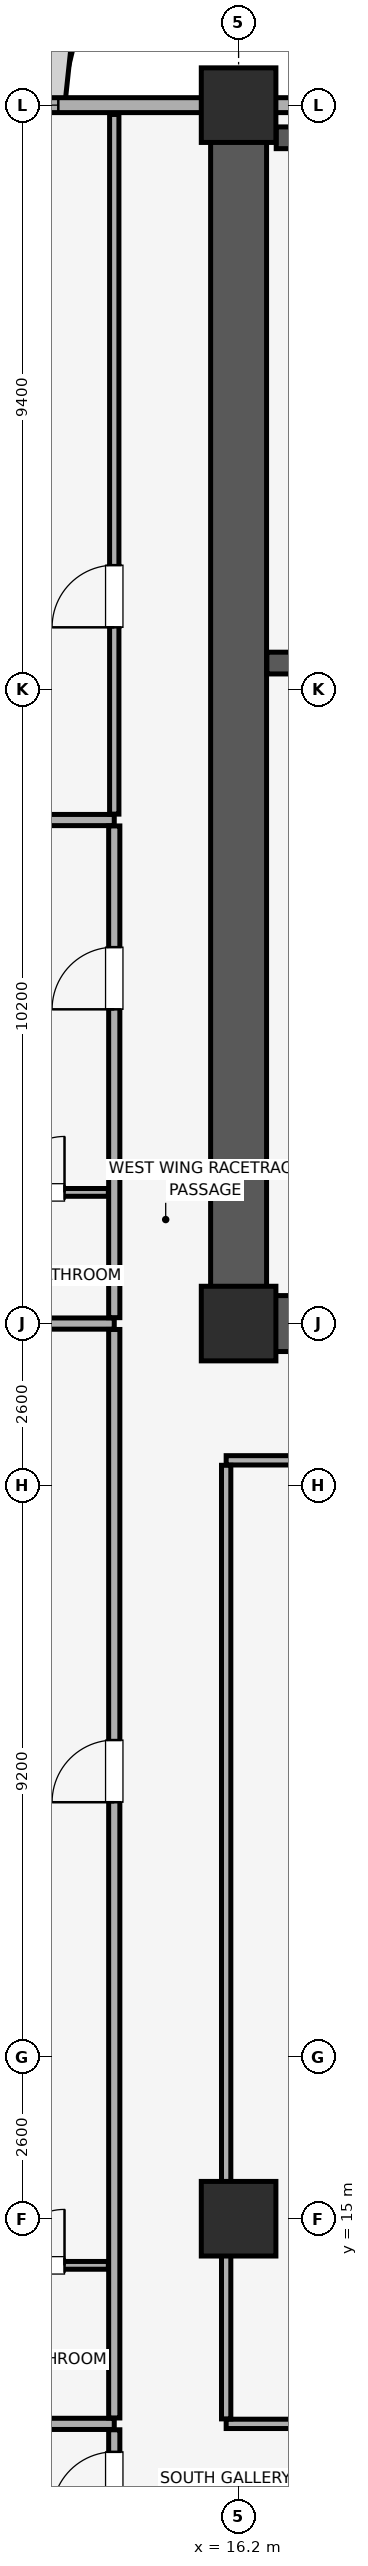
"""IFC4 building model, lengths in metres.
Left out: names, types, materials, properties, quantities, classifications, styles, units other than length and angle.
Written with IfcOpenShell. Run it as: python <this file> out.ifc"""

import sys

from ifc_helpers import new_model, si_unit, direction, frame, frame_2d, origin, origin_2d, place, context, subcontext, project, spatial, rectangle, extrude, element, fill, save


model = new_model("IFC4")
c1 = context("Model", 3, precision=1e-05, world=origin(), true_north=direction((0.0, 1.0)))
c2 = subcontext(c1, "Body", "Model", "MODEL_VIEW")
j1 = project(units=[si_unit("LENGTHUNIT", "METRE"), si_unit("PLANEANGLEUNIT", "RADIAN")], contexts=[c1])
p1 = place(None, origin())
s1 = spatial("IfcSite", under=j1, at=p1, CompositionType="ELEMENT")
p2 = place(p1, origin())
s2 = spatial("IfcBuilding", under=s1, at=p2, CompositionType="ELEMENT")
p3 = place(p2, frame((0.0, 0.0, 135.35)))
s3 = spatial("IfcBuildingStorey", under=s2, at=p3, CompositionType="ELEMENT", Elevation=135.35)
for number, where, z_axis, x_axis in (
    (1, (16.2, 15.0, 0.0), (0.0, 0.0, 1.0), (1.0, 0.0, 0.0)),
    (2, (16.2, 29.4, 0.0), (0.0, 0.0, 1.0), (1.0, 0.0, 0.0)),
    (3, (16.2, 49.0, 0.0), (0.0, 0.0, 1.0), (1.0, 0.0, 0.0)),
):
    element("IfcColumn", number, at=place(p3, frame(where, z_axis=z_axis, x_axis=x_axis)), inside=s3, PredefinedType="COLUMN", context=c2, shape_type="SweptSolid", body=[
        extrude(rectangle(XDim=1.2, YDim=1.2, at=origin_2d()), origin(), (0.0, 0.0, 1.0), 3.56),
    ])
p4 = place(p3, frame((77.0, 49.0, 0.0), z_axis=(0.0, 0.0, 1.0), x_axis=(-1.0, 0.0, 0.0)))
e4 = element("IfcWall", 4, at=p4, inside=s3, PredefinedType="SOLIDWALL", context=c2, shape_type="SweptSolid", body=[
    extrude(rectangle(XDim=70.0, YDim=0.24, at=frame_2d((35.0, 0.0))), origin(), (0.0, 0.0, 1.0), 2.61),
])
p5 = place(p4, frame((63.7, 0.0, 0.85)))
e5 = element("IfcOpeningElement", 5, at=p5, cuts=e4, PredefinedType="OPENING", context=c2, shape_type="SweptSolid", body=[
    extrude(rectangle(XDim=3.0, YDim=1.5, at=frame_2d((1.5, 0.75))), frame((0.0, 0.13, 0.0), z_axis=(0.0, -1.0, 0.0), x_axis=(1.0, 0.0, 0.0)), (0.0, 0.0, 1.0), 0.26),
])
p6 = place(p4, frame((3.3, 0.0, 0.85)))
e6 = element("IfcOpeningElement", 6, at=p6, cuts=e4, PredefinedType="OPENING", context=c2, shape_type="SweptSolid", body=[
    extrude(rectangle(XDim=3.0, YDim=1.5, at=frame_2d((1.5, 0.75))), frame((0.0, 0.13, 0.0), z_axis=(0.0, -1.0, 0.0), x_axis=(1.0, 0.0, 0.0)), (0.0, 0.0, 1.0), 0.26),
])
p7 = place(p4, frame((48.565, 0.0, 0.9)))
e7 = element("IfcOpeningElement", 7, at=p7, cuts=e4, PredefinedType="OPENING", context=c2, shape_type="SweptSolid", body=[
    extrude(rectangle(XDim=1.5, YDim=1.4, at=frame_2d((0.75, 0.7))), frame((0.0, 0.13, 0.0), z_axis=(0.0, -1.0, 0.0), x_axis=(1.0, 0.0, 0.0)), (0.0, 0.0, 1.0), 0.26),
])
p8 = place(p4, frame((41.75, 0.0, 0.9)))
e8 = element("IfcOpeningElement", 8, at=p8, cuts=e4, PredefinedType="OPENING", context=c2, shape_type="SweptSolid", body=[
    extrude(rectangle(XDim=1.5, YDim=1.4, at=frame_2d((0.75, 0.7))), frame((0.0, 0.13, 0.0), z_axis=(0.0, -1.0, 0.0), x_axis=(1.0, 0.0, 0.0)), (0.0, 0.0, 1.0), 0.26),
])
p9 = place(p4, frame((25.3, 0.0, 0.9)))
e9 = element("IfcOpeningElement", 9, at=p9, cuts=e4, PredefinedType="OPENING", context=c2, shape_type="SweptSolid", body=[
    extrude(rectangle(XDim=1.5, YDim=1.4, at=frame_2d((0.75, 0.7))), frame((0.0, 0.13, 0.0), z_axis=(0.0, -1.0, 0.0), x_axis=(1.0, 0.0, 0.0)), (0.0, 0.0, 1.0), 0.26),
])
p10 = place(p4, frame((20.685, 0.0, 0.9)))
e10 = element("IfcOpeningElement", 10, at=p10, cuts=e4, PredefinedType="OPENING", context=c2, shape_type="SweptSolid", body=[
    extrude(rectangle(XDim=1.5, YDim=1.4, at=frame_2d((0.75, 0.7))), frame((0.0, 0.13, 0.0), z_axis=(0.0, -1.0, 0.0), x_axis=(1.0, 0.0, 0.0)), (0.0, 0.0, 1.0), 0.26),
])
p11 = place(p3, frame((16.2, 29.4, 0.0), z_axis=(0.0, 0.0, 1.0), x_axis=(0.0, 1.0, 0.0)))
e11 = element("IfcWall", 11, at=p11, inside=s3, PredefinedType="SHEAR", context=c2, shape_type="SweptSolid", body=[
    extrude(rectangle(XDim=19.2, YDim=0.9, at=frame_2d((9.6, 0.0))), origin(), (0.0, 0.0, 1.0), 3.56),
])
p12 = place(p3, frame((16.655, 29.4, 0.0), z_axis=(0.0, 0.0, 1.0), x_axis=(1.0, 0.0, 0.0)))
e12 = element("IfcWall", 12, at=p12, inside=s3, PredefinedType="SHEAR", context=c2, shape_type="SweptSolid", body=[
    extrude(rectangle(XDim=6.945, YDim=0.9, at=frame_2d((3.473, 0.0))), origin(), (0.0, 0.0, 1.0), 3.56),
])
p13 = place(p3, frame((16.655, 40.025, 0.0), z_axis=(0.0, 0.0, 1.0), x_axis=(1.0, 0.0, 0.0)))
e13 = element("IfcWall", 13, at=p13, inside=s3, PredefinedType="SHEAR", context=c2, shape_type="SweptSolid", body=[
    extrude(rectangle(XDim=4.2, YDim=0.35, at=frame_2d((2.1, 0.0))), origin(), (0.0, 0.0, 1.0), 3.56),
])
p14 = place(p13, frame((1.81, 0.0, 0.0)))
e14 = element("IfcOpeningElement", 14, at=p14, cuts=e13, PredefinedType="OPENING", context=c2, shape_type="SweptSolid", body=[
    extrude(rectangle(XDim=1.15, YDim=2.15, at=frame_2d((0.575, 1.075))), frame((0.0, 0.185, 0.0), z_axis=(0.0, -1.0, 0.0), x_axis=(1.0, 0.0, 0.0)), (0.0, 0.0, 1.0), 0.37),
])
p15 = place(p3, frame((16.805, 48.475, 0.0), z_axis=(0.0, 0.0, 1.0), x_axis=(1.0, 0.0, 0.0)))
e15 = element("IfcWall", 15, at=p15, inside=s3, PredefinedType="SHEAR", context=c2, shape_type="SweptSolid", body=[
    extrude(rectangle(XDim=4.05, YDim=0.35, at=frame_2d((2.025, 0.0))), origin(), (0.0, 0.0, 1.0), 3.56),
])
p16 = place(p3, frame((3.15, 11.7, 0.0), z_axis=(0.0, 0.0, 1.0), x_axis=(1.0, 0.0, 0.0)))
e16 = element("IfcWall", 16, at=p16, inside=s3, PredefinedType="PARTITIONING", context=c2, shape_type="SweptSolid", body=[
    extrude(rectangle(XDim=11.05, YDim=0.18, at=frame_2d((5.525, 0.0))), origin(), (0.0, 0.0, 1.0), 3.56),
])
p17 = place(p3, frame((14.2, 9.895, 0.0), z_axis=(0.0, 0.0, 1.0), x_axis=(0.0, 1.0, 0.0)))
e17 = element("IfcWall", 17, at=p17, inside=s3, PredefinedType="PARTITIONING", context=c2, shape_type="SweptSolid", body=[
    extrude(rectangle(XDim=1.71, YDim=0.18, at=frame_2d((0.855, 0.0))), origin(), (0.0, 0.0, 1.0), 3.56),
])
p18 = place(p17, frame((0.355, 0.0, 0.0)))
e18 = element("IfcOpeningElement", 18, at=p18, cuts=e17, PredefinedType="OPENING", context=c2, shape_type="SweptSolid", body=[
    extrude(rectangle(XDim=1.0, YDim=2.15, at=frame_2d((0.5, 1.075))), frame((0.0, 0.1, 0.0), z_axis=(0.0, -1.0, 0.0), x_axis=(1.0, 0.0, 0.0)), (0.0, 0.0, 1.0), 0.2),
])
p19 = place(p3, frame((3.15, 29.4, 0.0), z_axis=(0.0, 0.0, 1.0), x_axis=(1.0, 0.0, 0.0)))
e19 = element("IfcWall", 19, at=p19, inside=s3, PredefinedType="PARTITIONING", context=c2, shape_type="SweptSolid", body=[
    extrude(rectangle(XDim=11.05, YDim=0.18, at=frame_2d((5.525, 0.0))), origin(), (0.0, 0.0, 1.0), 2.91),
])
p20 = place(p3, frame((14.2, 11.795, 0.0), z_axis=(0.0, 0.0, 1.0), x_axis=(0.0, 1.0, 0.0)))
e20 = element("IfcWall", 20, at=p20, inside=s3, PredefinedType="PARTITIONING", context=c2, shape_type="SweptSolid", body=[
    extrude(rectangle(XDim=17.51, YDim=0.18, at=frame_2d((8.755, 0.0))), origin(), (0.0, 0.0, 1.0), 3.56),
])
p21 = place(p20, frame((9.905, 0.0, 0.0)))
e21 = element("IfcOpeningElement", 21, at=p21, cuts=e20, PredefinedType="OPENING", context=c2, shape_type="SweptSolid", body=[
    extrude(rectangle(XDim=1.0, YDim=2.15, at=frame_2d((0.5, 1.075))), frame((0.0, 0.1, 0.0), z_axis=(0.0, -1.0, 0.0), x_axis=(1.0, 0.0, 0.0)), (0.0, 0.0, 1.0), 0.2),
])
p22 = place(p3, frame((11.7, 14.25, 0.0), z_axis=(0.0, 0.0, 1.0), x_axis=(1.0, 0.0, 0.0)))
e22 = element("IfcWall", 22, at=p22, inside=s3, PredefinedType="PARTITIONING", context=c2, shape_type="SweptSolid", body=[
    extrude(rectangle(XDim=2.405, YDim=0.125, at=frame_2d((1.203, 0.0))), origin(), (0.0, 0.0, 1.0), 3.56),
])
p23 = place(p22, frame((0.8, 0.0, 0.0)))
e23 = element("IfcOpeningElement", 23, at=p23, cuts=e22, PredefinedType="OPENING", context=c2, shape_type="SweptSolid", body=[
    extrude(rectangle(XDim=0.9, YDim=2.1, at=frame_2d((0.45, 1.05))), frame((0.0, 0.073, 0.0), z_axis=(0.0, -1.0, 0.0), x_axis=(1.0, 0.0, 0.0)), (0.0, 0.0, 1.0), 0.145),
])
p24 = place(p3, frame((16.0, 11.7, 0.0), z_axis=(0.0, 0.0, 1.0), x_axis=(1.0, 0.0, 0.0)))
e24 = element("IfcWall", 24, at=p24, inside=s3, PredefinedType="PARTITIONING", context=c2, shape_type="SweptSolid", body=[
    extrude(rectangle(XDim=9.0, YDim=0.15, at=frame_2d((4.5, 0.0))), origin(), (0.0, 0.0, 1.0), 3.56),
])
p25 = place(p3, frame((16.0, 27.2, 0.0), z_axis=(0.0, 0.0, 1.0), x_axis=(1.0, 0.0, 0.0)))
e25 = element("IfcWall", 25, at=p25, inside=s3, PredefinedType="PARTITIONING", context=c2, shape_type="SweptSolid", body=[
    extrude(rectangle(XDim=9.0, YDim=0.15, at=frame_2d((4.5, 0.0))), origin(), (0.0, 0.0, 1.0), 3.56),
])
p26 = place(p25, frame((4.0, 0.0, 0.0)))
e26 = element("IfcOpeningElement", 26, at=p26, cuts=e25, PredefinedType="OPENING", context=c2, shape_type="SweptSolid", body=[
    extrude(rectangle(XDim=1.0, YDim=2.15, at=frame_2d((0.5, 1.075))), frame((0.0, 0.085, 0.0), z_axis=(0.0, -1.0, 0.0), x_axis=(1.0, 0.0, 0.0)), (0.0, 0.0, 1.0), 0.17),
])
p27 = place(p3, frame((16.0, 11.78, 0.0), z_axis=(0.0, 0.0, 1.0), x_axis=(0.0, 1.0, 0.0)))
e27 = element("IfcWall", 27, at=p27, inside=s3, PredefinedType="PARTITIONING", context=c2, shape_type="SweptSolid", body=[
    extrude(rectangle(XDim=15.34, YDim=0.15, at=frame_2d((7.67, 0.0))), origin(), (0.0, 0.0, 1.0), 3.01),
])
p28 = place(p3, frame((3.15, 37.5, 0.0), z_axis=(0.0, 0.0, 1.0), x_axis=(1.0, 0.0, 0.0)))
e28 = element("IfcWall", 28, at=p28, inside=s3, PredefinedType="PARTITIONING", context=c2, shape_type="SweptSolid", body=[
    extrude(rectangle(XDim=11.05, YDim=0.18, at=frame_2d((5.525, 0.0))), origin(), (0.0, 0.0, 1.0), 3.56),
])
p29 = place(p3, frame((14.2, 29.495, 0.0), z_axis=(0.0, 0.0, 1.0), x_axis=(0.0, 1.0, 0.0)))
e29 = element("IfcWall", 29, at=p29, inside=s3, PredefinedType="PARTITIONING", context=c2, shape_type="SweptSolid", body=[
    extrude(rectangle(XDim=7.91, YDim=0.18, at=frame_2d((3.955, 0.0))), origin(), (0.0, 0.0, 1.0), 3.56),
])
p30 = place(p29, frame((4.96, 0.0, 0.0)))
e30 = element("IfcOpeningElement", 30, at=p30, cuts=e29, PredefinedType="OPENING", context=c2, shape_type="SweptSolid", body=[
    extrude(rectangle(XDim=1.0, YDim=2.15, at=frame_2d((0.5, 1.075))), frame((0.0, 0.1, 0.0), z_axis=(0.0, -1.0, 0.0), x_axis=(1.0, 0.0, 0.0)), (0.0, 0.0, 1.0), 0.2),
])
p31 = place(p3, frame((11.7, 31.51, 0.0), z_axis=(0.0, 0.0, 1.0), x_axis=(1.0, 0.0, 0.0)))
e31 = element("IfcWall", 31, at=p31, inside=s3, PredefinedType="PARTITIONING", context=c2, shape_type="SweptSolid", body=[
    extrude(rectangle(XDim=2.405, YDim=0.125, at=frame_2d((1.203, 0.0))), origin(), (0.0, 0.0, 1.0), 3.56),
])
p32 = place(p31, frame((0.8, 0.0, 0.0)))
e32 = element("IfcOpeningElement", 32, at=p32, cuts=e31, PredefinedType="OPENING", context=c2, shape_type="SweptSolid", body=[
    extrude(rectangle(XDim=0.9, YDim=2.1, at=frame_2d((0.45, 1.05))), frame((0.0, 0.073, 0.0), z_axis=(0.0, -1.0, 0.0), x_axis=(1.0, 0.0, 0.0)), (0.0, 0.0, 1.0), 0.145),
])
p33 = place(p3, frame((14.2, 37.595, 0.0), z_axis=(0.0, 0.0, 1.0), x_axis=(0.0, 1.0, 0.0)))
e33 = element("IfcWall", 33, at=p33, inside=s3, PredefinedType="PARTITIONING", context=c2, shape_type="SweptSolid", body=[
    extrude(rectangle(XDim=11.255, YDim=0.15, at=frame_2d((5.627, 0.0))), origin(), (0.0, 0.0, 1.0), 3.56),
])
p34 = place(p33, frame((3.005, 0.0, 0.0)))
e34 = element("IfcOpeningElement", 34, at=p34, cuts=e33, PredefinedType="OPENING", context=c2, shape_type="SweptSolid", body=[
    extrude(rectangle(XDim=1.0, YDim=2.15, at=frame_2d((0.5, 1.075))), frame((0.0, 0.085, 0.0), z_axis=(0.0, -1.0, 0.0), x_axis=(1.0, 0.0, 0.0)), (0.0, 0.0, 1.0), 0.17),
])
p35 = place(p5, origin())
e35 = element("IfcWindow", 35, at=p35, inside=s3, PartitioningType="SINGLE_PANEL", PredefinedType="WINDOW", context=c2, shape_type="SweptSolid", body=[
    extrude(rectangle(XDim=3.0, YDim=1.5, at=frame_2d((1.5, 0.75))), frame((0.0, 0.03, 0.0), z_axis=(0.0, -1.0, 0.0), x_axis=(1.0, 0.0, 0.0)), (0.0, 0.0, 1.0), 0.06),
])
fill(e5, e35)
p36 = place(p18, origin())
e36 = element("IfcDoor", 36, at=p36, inside=s3, OperationType="SINGLE_SWING_LEFT", PredefinedType="DOOR", context=c2, shape_type="SweptSolid", body=[
    extrude(rectangle(XDim=1.0, YDim=2.15, at=frame_2d((0.5, 1.075))), frame((0.0, 0.025, 0.0), z_axis=(0.0, -1.0, 0.0), x_axis=(1.0, 0.0, 0.0)), (0.0, 0.0, 1.0), 0.05),
])
fill(e18, e36)
p37 = place(p21, origin())
e37 = element("IfcDoor", 37, at=p37, inside=s3, OperationType="SINGLE_SWING_LEFT", PredefinedType="DOOR", context=c2, shape_type="SweptSolid", body=[
    extrude(rectangle(XDim=1.0, YDim=2.15, at=frame_2d((0.5, 1.075))), frame((0.0, 0.025, 0.0), z_axis=(0.0, -1.0, 0.0), x_axis=(1.0, 0.0, 0.0)), (0.0, 0.0, 1.0), 0.05),
])
fill(e21, e37)
p38 = place(p23, origin())
e38 = element("IfcDoor", 38, at=p38, inside=s3, OperationType="SINGLE_SWING_RIGHT", PredefinedType="DOOR", context=c2, shape_type="SweptSolid", body=[
    extrude(rectangle(XDim=0.9, YDim=2.1, at=frame_2d((0.45, 1.05))), frame((0.0, 0.025, 0.0), z_axis=(0.0, -1.0, 0.0), x_axis=(1.0, 0.0, 0.0)), (0.0, 0.0, 1.0), 0.05),
])
fill(e23, e38)
p39 = place(p30, origin())
e39 = element("IfcDoor", 39, at=p39, inside=s3, OperationType="SINGLE_SWING_LEFT", PredefinedType="DOOR", context=c2, shape_type="SweptSolid", body=[
    extrude(rectangle(XDim=1.0, YDim=2.15, at=frame_2d((0.5, 1.075))), frame((0.0, 0.025, 0.0), z_axis=(0.0, -1.0, 0.0), x_axis=(1.0, 0.0, 0.0)), (0.0, 0.0, 1.0), 0.05),
])
fill(e30, e39)
p40 = place(p32, origin())
e40 = element("IfcDoor", 40, at=p40, inside=s3, OperationType="SINGLE_SWING_RIGHT", PredefinedType="DOOR", context=c2, shape_type="SweptSolid", body=[
    extrude(rectangle(XDim=0.9, YDim=2.1, at=frame_2d((0.45, 1.05))), frame((0.0, 0.025, 0.0), z_axis=(0.0, -1.0, 0.0), x_axis=(1.0, 0.0, 0.0)), (0.0, 0.0, 1.0), 0.05),
])
fill(e32, e40)
p41 = place(p34, origin())
e41 = element("IfcDoor", 41, at=p41, inside=s3, OperationType="SINGLE_SWING_LEFT", PredefinedType="DOOR", context=c2, shape_type="SweptSolid", body=[
    extrude(rectangle(XDim=1.0, YDim=2.15, at=frame_2d((0.5, 1.075))), frame((0.0, 0.025, 0.0), z_axis=(0.0, -1.0, 0.0), x_axis=(1.0, 0.0, 0.0)), (0.0, 0.0, 1.0), 0.05),
])
fill(e34, e41)
save(model, sys.argv[1])
